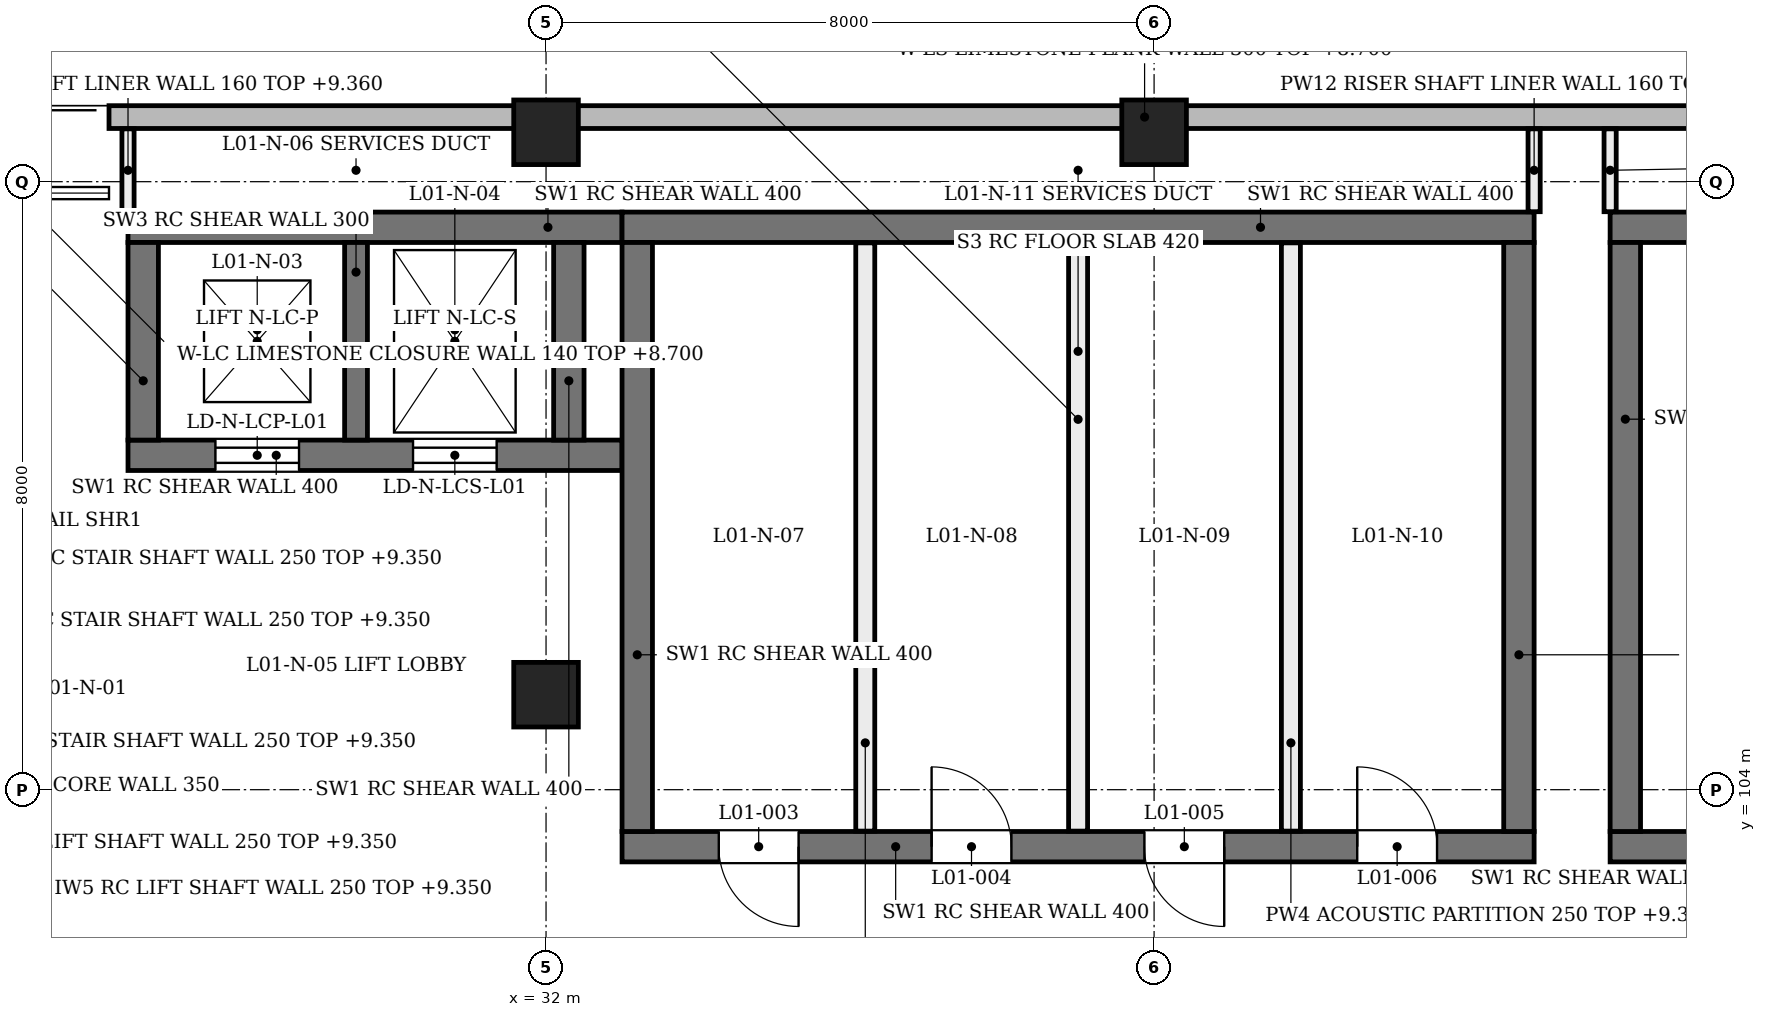
"""IFC4 building model, lengths in metres.
Left out: names, types, materials, properties, quantities, classifications, styles, units other than length and angle.
Written with IfcOpenShell. Run it as: python <this file> out.ifc"""

import sys

from ifc_helpers import new_model, si_unit, direction, frame, frame_2d, origin, origin_2d, place, context, subcontext, project, spatial, rectangle, extrude, element, fill, save


model = new_model("IFC4")
c1 = context("Model", 3, precision=1e-05, world=origin(), true_north=direction((0.0, 1.0)))
c2 = subcontext(c1, "Body", "Model", "MODEL_VIEW")
j1 = project(units=[si_unit("LENGTHUNIT", "METRE"), si_unit("PLANEANGLEUNIT", "RADIAN")], contexts=[c1])
p1 = place(None, origin())
s1 = spatial("IfcSite", under=j1, at=p1, CompositionType="ELEMENT")
p2 = place(p1, origin())
s2 = spatial("IfcBuilding", under=s1, at=p2, CompositionType="ELEMENT")
p3 = place(p2, frame((0.0, 0.0, 4.8)))
s3 = spatial("IfcBuildingStorey", under=s2, at=p3, CompositionType="ELEMENT", Elevation=4.8)
p4 = place(p3, frame((26.5, 108.4, 0.0), z_axis=(0.0, 0.0, 1.0), x_axis=(1.0, 0.0, 0.0)))
e1 = element("IfcWall", 1, at=p4, inside=s3, PredefinedType="SHEAR", context=c2, shape_type="SweptSolid", body=[
    extrude(rectangle(XDim=6.5, YDim=0.4, at=frame_2d((3.25, 0.0))), origin(), (0.0, 0.0, 1.0), 4.58),
])
p5 = place(p4, frame((1.15, 0.0, 0.0)))
e2 = element("IfcOpeningElement", 2, at=p5, cuts=e1, PredefinedType="OPENING", context=c2, shape_type="SweptSolid", body=[
    extrude(rectangle(XDim=1.1, YDim=2.1, at=frame_2d((0.55, 1.05))), frame((0.0, 0.21, 0.0), z_axis=(0.0, -1.0, 0.0), x_axis=(1.0, 0.0, 0.0)), (0.0, 0.0, 1.0), 0.42),
])
p6 = place(p4, frame((3.75, 0.0, 0.0)))
e3 = element("IfcOpeningElement", 3, at=p6, cuts=e1, PredefinedType="OPENING", context=c2, shape_type="SweptSolid", body=[
    extrude(rectangle(XDim=1.1, YDim=2.1, at=frame_2d((0.55, 1.05))), frame((0.0, 0.21, 0.0), z_axis=(0.0, -1.0, 0.0), x_axis=(1.0, 0.0, 0.0)), (0.0, 0.0, 1.0), 0.42),
])
p7 = place(p3, frame((26.5, 111.4, 0.0), z_axis=(0.0, 0.0, 1.0), x_axis=(1.0, 0.0, 0.0)))
e4 = element("IfcWall", 4, at=p7, inside=s3, PredefinedType="SHEAR", context=c2, shape_type="SweptSolid", body=[
    extrude(rectangle(XDim=6.5, YDim=0.4, at=frame_2d((3.25, 0.0))), origin(), (0.0, 0.0, 1.0), 4.58),
])
for number, where, z_axis, x_axis in (
    (5, (26.7, 108.6, 0.0), (0.0, 0.0, 1.0), (0.0, 1.0, 0.0)),
    (6, (32.3, 108.6, 0.0), (0.0, 0.0, 1.0), (0.0, 1.0, 0.0)),
):
    element("IfcWall", number, at=place(p3, frame(where, z_axis=z_axis, x_axis=x_axis)), inside=s3, PredefinedType="SHEAR", context=c2, shape_type="SweptSolid", body=[
        extrude(rectangle(XDim=2.6, YDim=0.4, at=frame_2d((1.3, 0.0))), origin(), (0.0, 0.0, 1.0), 4.58),
    ])
p8 = place(p3, frame((29.5, 108.6, 0.0), z_axis=(0.0, 0.0, 1.0), x_axis=(0.0, 1.0, 0.0)))
e7 = element("IfcWall", 7, at=p8, inside=s3, PredefinedType="SHEAR", context=c2, shape_type="SweptSolid", body=[
    extrude(rectangle(XDim=2.6, YDim=0.3, at=frame_2d((1.3, 0.0))), origin(), (0.0, 0.0, 1.0), 4.58),
])
p9 = place(p3, frame((33.0, 103.25, 0.0), z_axis=(0.0, 0.0, 1.0), x_axis=(1.0, 0.0, 0.0)))
e8 = element("IfcWall", 8, at=p9, inside=s3, PredefinedType="SHEAR", context=c2, shape_type="SweptSolid", body=[
    extrude(rectangle(XDim=12.0, YDim=0.4, at=frame_2d((6.0, 0.0))), origin(), (0.0, 0.0, 1.0), 4.58),
])
p10 = place(p9, frame((1.273, 0.0, 0.0)))
e9 = element("IfcOpeningElement", 9, at=p10, cuts=e8, PredefinedType="OPENING", context=c2, shape_type="SweptSolid", body=[
    extrude(rectangle(XDim=1.05, YDim=2.2, at=frame_2d((0.525, 1.1))), frame((0.0, 0.21, 0.0), z_axis=(0.0, -1.0, 0.0), x_axis=(1.0, 0.0, 0.0)), (0.0, 0.0, 1.0), 0.42),
])
p11 = place(p9, frame((4.073, 0.0, 0.0)))
e10 = element("IfcOpeningElement", 10, at=p11, cuts=e8, PredefinedType="OPENING", context=c2, shape_type="SweptSolid", body=[
    extrude(rectangle(XDim=1.05, YDim=2.2, at=frame_2d((0.525, 1.1))), frame((0.0, 0.21, 0.0), z_axis=(0.0, -1.0, 0.0), x_axis=(1.0, 0.0, 0.0)), (0.0, 0.0, 1.0), 0.42),
])
p12 = place(p9, frame((6.873, 0.0, 0.0)))
e11 = element("IfcOpeningElement", 11, at=p12, cuts=e8, PredefinedType="OPENING", context=c2, shape_type="SweptSolid", body=[
    extrude(rectangle(XDim=1.05, YDim=2.2, at=frame_2d((0.525, 1.1))), frame((0.0, 0.21, 0.0), z_axis=(0.0, -1.0, 0.0), x_axis=(1.0, 0.0, 0.0)), (0.0, 0.0, 1.0), 0.42),
])
p13 = place(p9, frame((9.673, 0.0, 0.0)))
e12 = element("IfcOpeningElement", 12, at=p13, cuts=e8, PredefinedType="OPENING", context=c2, shape_type="SweptSolid", body=[
    extrude(rectangle(XDim=1.05, YDim=2.2, at=frame_2d((0.525, 1.1))), frame((0.0, 0.21, 0.0), z_axis=(0.0, -1.0, 0.0), x_axis=(1.0, 0.0, 0.0)), (0.0, 0.0, 1.0), 0.42),
])
p14 = place(p3, frame((33.0, 111.4, 0.0), z_axis=(0.0, 0.0, 1.0), x_axis=(1.0, 0.0, 0.0)))
e13 = element("IfcWall", 13, at=p14, inside=s3, PredefinedType="SHEAR", context=c2, shape_type="SweptSolid", body=[
    extrude(rectangle(XDim=12.0, YDim=0.4, at=frame_2d((6.0, 0.0))), origin(), (0.0, 0.0, 1.0), 4.58),
])
for number, where, z_axis, x_axis in (
    (14, (33.2, 103.45, 0.0), (0.0, 0.0, 1.0), (0.0, 1.0, 0.0)),
    (15, (44.8, 103.45, 0.0), (0.0, 0.0, 1.0), (0.0, 1.0, 0.0)),
):
    element("IfcWall", number, at=place(p3, frame(where, z_axis=z_axis, x_axis=x_axis)), inside=s3, PredefinedType="SHEAR", context=c2, shape_type="SweptSolid", body=[
        extrude(rectangle(XDim=7.75, YDim=0.4, at=frame_2d((3.875, 0.0))), origin(), (0.0, 0.0, 1.0), 4.58),
    ])
p15 = place(p3, frame((46.0, 103.25, 0.0), z_axis=(0.0, 0.0, 1.0), x_axis=(1.0, 0.0, 0.0)))
e16 = element("IfcWall", 16, at=p15, inside=s3, PredefinedType="SHEAR", context=c2, shape_type="SweptSolid", body=[
    extrude(rectangle(XDim=10.0, YDim=0.4, at=frame_2d((5.0, 0.0))), origin(), (0.0, 0.0, 1.0), 4.58),
])
p16 = place(p15, frame((2.025, 0.0, 0.0)))
e17 = element("IfcOpeningElement", 17, at=p16, cuts=e16, PredefinedType="OPENING", context=c2, shape_type="SweptSolid", body=[
    extrude(rectangle(XDim=1.2, YDim=2.2, at=frame_2d((0.6, 1.1))), frame((0.0, 0.21, 0.0), z_axis=(0.0, -1.0, 0.0), x_axis=(1.0, 0.0, 0.0)), (0.0, 0.0, 1.0), 0.42),
])
p17 = place(p15, frame((6.625, 0.0, 0.0)))
e18 = element("IfcOpeningElement", 18, at=p17, cuts=e16, PredefinedType="OPENING", context=c2, shape_type="SweptSolid", body=[
    extrude(rectangle(XDim=1.2, YDim=2.2, at=frame_2d((0.6, 1.1))), frame((0.0, 0.21, 0.0), z_axis=(0.0, -1.0, 0.0), x_axis=(1.0, 0.0, 0.0)), (0.0, 0.0, 1.0), 0.42),
])
p18 = place(p3, frame((46.0, 111.4, 0.0), z_axis=(0.0, 0.0, 1.0), x_axis=(1.0, 0.0, 0.0)))
e19 = element("IfcWall", 19, at=p18, inside=s3, PredefinedType="SHEAR", context=c2, shape_type="SweptSolid", body=[
    extrude(rectangle(XDim=10.0, YDim=0.4, at=frame_2d((5.0, 0.0))), origin(), (0.0, 0.0, 1.0), 4.58),
])
p19 = place(p3, frame((46.2, 103.45, 0.0), z_axis=(0.0, 0.0, 1.0), x_axis=(0.0, 1.0, 0.0)))
e20 = element("IfcWall", 20, at=p19, inside=s3, PredefinedType="SHEAR", context=c2, shape_type="SweptSolid", body=[
    extrude(rectangle(XDim=7.75, YDim=0.4, at=frame_2d((3.875, 0.0))), origin(), (0.0, 0.0, 1.0), 4.58),
])
for number, where, z_axis, x_axis in (
    (21, (32.0, 105.0, 0.0), (0.0, 0.204, 0.979), (-1.0, 0.0, 0.0)),
    (22, (32.0, 112.4, 0.0), (0.0, 0.204, 0.979), (-1.0, 0.0, 0.0)),
    (23, (40.0, 112.4, 0.0), (0.0, 0.204, 0.979), (-1.0, 0.0, 0.0)),
):
    element("IfcColumn", number, at=place(p3, frame(where, z_axis=z_axis, x_axis=x_axis)), inside=s3, PredefinedType="COLUMN", context=c2, shape_type="SweptSolid", body=[
        extrude(rectangle(XDim=0.85, YDim=0.85, at=origin_2d()), origin(), (0.0, 0.0, 1.0), 4.903),
    ])
p20 = place(p3, frame((26.25, 112.85, 0.0), z_axis=(0.0, 0.0, 1.0), x_axis=(1.0, 0.0, 0.0)))
e24 = element("IfcWall", 24, at=p20, inside=s3, PredefinedType="SOLIDWALL", context=c2, shape_type="SweptSolid", body=[
    extrude(rectangle(XDim=51.5, YDim=0.3, at=frame_2d((25.75, 0.0))), origin(), (0.0, 0.0, 1.0), 3.9),
])
p21 = place(p3, frame((26.5, 111.605, 0.0), z_axis=(0.0, 0.0, 1.0), x_axis=(0.0, 1.0, 0.0)))
e25 = element("IfcWall", 25, at=p21, inside=s3, PredefinedType="PARTITIONING", context=c2, shape_type="SweptSolid", body=[
    extrude(rectangle(XDim=1.09, YDim=0.16, at=frame_2d((0.545, 0.0))), origin(), (0.0, 0.0, 1.0), 4.56),
])
for number, where, z_axis, x_axis in (
    (26, (36.2, 103.455, 0.0), (0.0, 0.0, 1.0), (0.0, 1.0, 0.0)),
    (27, (39.0, 103.455, 0.0), (0.0, 0.0, 1.0), (0.0, 1.0, 0.0)),
    (28, (41.8, 103.455, 0.0), (0.0, 0.0, 1.0), (0.0, 1.0, 0.0)),
):
    element("IfcWall", number, at=place(p3, frame(where, z_axis=z_axis, x_axis=x_axis)), inside=s3, PredefinedType="PARTITIONING", context=c2, shape_type="SweptSolid", body=[
        extrude(rectangle(XDim=7.74, YDim=0.25, at=frame_2d((3.87, 0.0))), origin(), (0.0, 0.0, 1.0), 4.56),
    ])
for number, where, z_axis, x_axis in (
    (29, (45.0, 111.605, 0.0), (0.0, 0.0, 1.0), (0.0, 1.0, 0.0)),
    (30, (46.0, 111.605, 0.0), (0.0, 0.0, 1.0), (0.0, 1.0, 0.0)),
):
    element("IfcWall", number, at=place(p3, frame(where, z_axis=z_axis, x_axis=x_axis)), inside=s3, PredefinedType="PARTITIONING", context=c2, shape_type="SweptSolid", body=[
        extrude(rectangle(XDim=1.09, YDim=0.16, at=frame_2d((0.545, 0.0))), origin(), (0.0, 0.0, 1.0), 4.56),
    ])
p22 = place(p5, frame((1.1, 0.0, 0.0), z_axis=(0.0, 0.0, 1.0), x_axis=(-1.0, 0.0, 0.0)))
e31 = element("IfcDoor", 31, at=p22, inside=s3, OperationType="DOUBLE_DOOR_SLIDING", PredefinedType="DOOR", context=c2, shape_type="SweptSolid", body=[
    extrude(rectangle(XDim=1.1, YDim=2.1, at=frame_2d((0.55, 1.05))), frame((0.0, 0.025, 0.0), z_axis=(0.0, -1.0, 0.0), x_axis=(1.0, 0.0, 0.0)), (0.0, 0.0, 1.0), 0.05),
])
fill(e2, e31)
p23 = place(p6, frame((1.1, 0.0, 0.0), z_axis=(0.0, 0.0, 1.0), x_axis=(-1.0, 0.0, 0.0)))
e32 = element("IfcDoor", 32, at=p23, inside=s3, OperationType="DOUBLE_DOOR_SLIDING", PredefinedType="DOOR", context=c2, shape_type="SweptSolid", body=[
    extrude(rectangle(XDim=1.1, YDim=2.1, at=frame_2d((0.55, 1.05))), frame((0.0, 0.025, 0.0), z_axis=(0.0, -1.0, 0.0), x_axis=(1.0, 0.0, 0.0)), (0.0, 0.0, 1.0), 0.05),
])
fill(e3, e32)
p24 = place(p10, origin())
e33 = element("IfcDoor", 33, at=p24, inside=s3, OperationType="SINGLE_SWING_RIGHT", PredefinedType="DOOR", context=c2, shape_type="SweptSolid", body=[
    extrude(rectangle(XDim=1.05, YDim=2.2, at=frame_2d((0.525, 1.1))), frame((0.0, 0.025, 0.0), z_axis=(0.0, -1.0, 0.0), x_axis=(1.0, 0.0, 0.0)), (0.0, 0.0, 1.0), 0.05),
])
fill(e9, e33)
p25 = place(p11, origin())
e34 = element("IfcDoor", 34, at=p25, inside=s3, OperationType="SINGLE_SWING_LEFT", PredefinedType="DOOR", context=c2, shape_type="SweptSolid", body=[
    extrude(rectangle(XDim=1.05, YDim=2.2, at=frame_2d((0.525, 1.1))), frame((0.0, 0.025, 0.0), z_axis=(0.0, -1.0, 0.0), x_axis=(1.0, 0.0, 0.0)), (0.0, 0.0, 1.0), 0.05),
])
fill(e10, e34)
p26 = place(p12, origin())
e35 = element("IfcDoor", 35, at=p26, inside=s3, OperationType="SINGLE_SWING_RIGHT", PredefinedType="DOOR", context=c2, shape_type="SweptSolid", body=[
    extrude(rectangle(XDim=1.05, YDim=2.2, at=frame_2d((0.525, 1.1))), frame((0.0, 0.025, 0.0), z_axis=(0.0, -1.0, 0.0), x_axis=(1.0, 0.0, 0.0)), (0.0, 0.0, 1.0), 0.05),
])
fill(e11, e35)
p27 = place(p13, origin())
e36 = element("IfcDoor", 36, at=p27, inside=s3, OperationType="SINGLE_SWING_LEFT", PredefinedType="DOOR", context=c2, shape_type="SweptSolid", body=[
    extrude(rectangle(XDim=1.05, YDim=2.2, at=frame_2d((0.525, 1.1))), frame((0.0, 0.025, 0.0), z_axis=(0.0, -1.0, 0.0), x_axis=(1.0, 0.0, 0.0)), (0.0, 0.0, 1.0), 0.05),
])
fill(e12, e36)
save(model, sys.argv[1])
